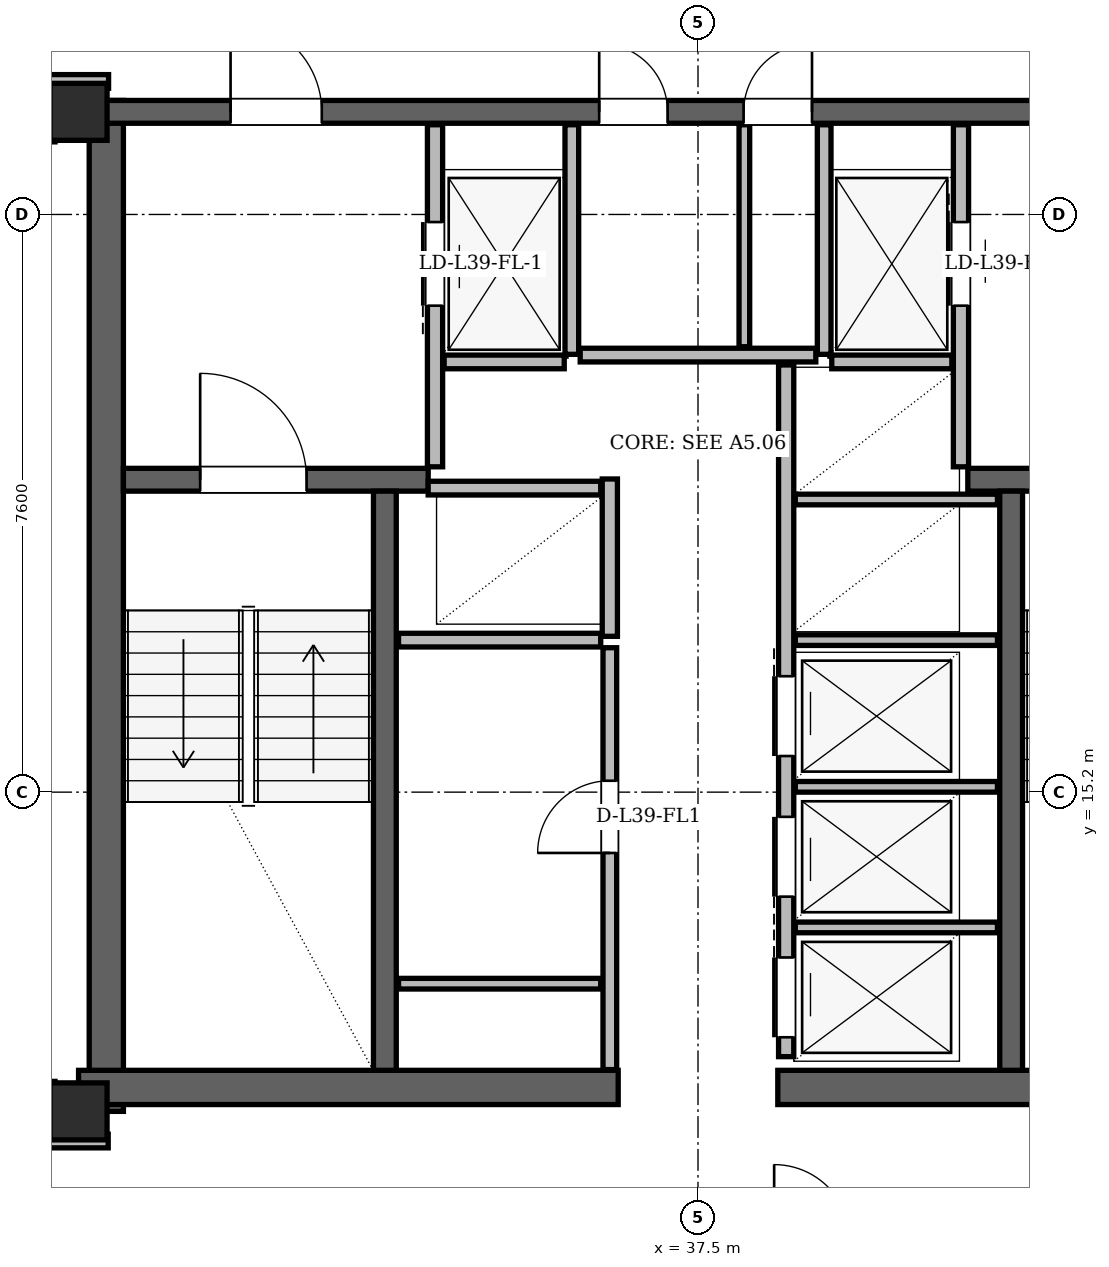
"""IFC4 building model, lengths in metres.
Left out: names, types, materials, properties, quantities, classifications, styles, units other than length and angle.
Written with IfcOpenShell. Run it as: python <this file> out.ifc"""

import sys

from ifc_helpers import new_model, si_unit, direction, frame, frame_2d, origin, origin_2d, place, context, subcontext, project, spatial, rectangle, hollow_rectangle, extrude, element, fill, save


model = new_model("IFC4")
c1 = context("Model", 3, precision=1e-05, world=origin(), true_north=direction((0.0, 1.0)))
c2 = subcontext(c1, "Body", "Model", "MODEL_VIEW")
j1 = project(units=[si_unit("LENGTHUNIT", "METRE"), si_unit("PLANEANGLEUNIT", "RADIAN")], contexts=[c1])
p1 = place(None, origin())
s1 = spatial("IfcSite", under=j1, at=p1, CompositionType="ELEMENT")
p2 = place(p1, origin())
s2 = spatial("IfcBuilding", under=s1, at=p2, CompositionType="ELEMENT")
p3 = place(p2, frame((0.0, 0.0, 149.4)))
s3 = spatial("IfcBuildingStorey", under=s2, at=p3, CompositionType="ELEMENT", Elevation=149.4)
for number, where, z_axis, x_axis in (
    (1, (29.35, 11.0, 0.0), (0.0, 0.0, 1.0), (1.0, 0.0, 0.0)),
    (2, (29.35, 24.15, 0.0), (0.0, 0.0, 1.0), (1.0, 0.0, 0.0)),
):
    element("IfcColumn", number, at=place(p3, frame(where, z_axis=z_axis, x_axis=x_axis)), inside=s3, PredefinedType="COLUMN", context=c2, shape_type="SweptSolid", body=[
        extrude(hollow_rectangle(XDim=0.75, YDim=0.75, WallThickness=0.06, at=origin_2d()), origin(), (0.0, 0.0, 1.0), 3.6),
    ])
p4 = place(p3, frame((29.715, 11.0, 0.0), z_axis=(0.0, 0.0, 1.0), x_axis=(0.0, 1.0, 0.0)))
e3 = element("IfcWall", 3, at=p4, inside=s3, PredefinedType="SHEAR", context=c2, shape_type="SweptSolid", body=[
    extrude(rectangle(XDim=13.3, YDim=0.45, at=frame_2d((6.65, 0.0))), origin(), (0.0, 0.0, 1.0), 3.38),
])
for number, where, z_axis, x_axis in (
    (4, (29.35, 11.315, 0.0), (0.0, 0.0, 1.0), (1.0, 0.0, 0.0)),
    (5, (38.55, 11.315, 0.0), (0.0, 0.0, 1.0), (1.0, 0.0, 0.0)),
):
    element("IfcWall", number, at=place(p3, frame(where, z_axis=z_axis, x_axis=x_axis)), inside=s3, PredefinedType="SHEAR", context=c2, shape_type="SweptSolid", body=[
        extrude(rectangle(XDim=7.1, YDim=0.45, at=frame_2d((3.55, 0.0))), origin(), (0.0, 0.0, 1.0), 3.38),
    ])
p5 = place(p3, frame((29.65, 24.15, 0.0), z_axis=(0.0, 0.0, 1.0), x_axis=(1.0, 0.0, 0.0)))
e6 = element("IfcWall", 6, at=p5, inside=s3, PredefinedType="SHEAR", context=c2, shape_type="SweptSolid", body=[
    extrude(rectangle(XDim=15.7, YDim=0.3, at=frame_2d((7.85, 0.0))), origin(), (0.0, 0.0, 1.0), 3.38),
])
p6 = place(p5, frame((1.7, 0.0, 0.0)))
e7 = element("IfcOpeningElement", 7, at=p6, cuts=e6, PredefinedType="OPENING", context=c2, shape_type="SweptSolid", body=[
    extrude(rectangle(XDim=1.2, YDim=2.2, at=frame_2d((0.6, 1.1))), frame((0.0, 0.15, 0.0), z_axis=(0.0, -1.0, 0.0), x_axis=(1.0, 0.0, 0.0)), (0.0, 0.0, 1.0), 0.3),
])
p7 = place(p5, frame((12.8, 0.0, 0.0)))
e8 = element("IfcOpeningElement", 8, at=p7, cuts=e6, PredefinedType="OPENING", context=c2, shape_type="SweptSolid", body=[
    extrude(rectangle(XDim=1.2, YDim=2.2, at=frame_2d((0.6, 1.1))), frame((0.0, 0.15, 0.0), z_axis=(0.0, -1.0, 0.0), x_axis=(1.0, 0.0, 0.0)), (0.0, 0.0, 1.0), 0.3),
])
p8 = place(p5, frame((6.55, 0.0, 0.0)))
e9 = element("IfcOpeningElement", 9, at=p8, cuts=e6, PredefinedType="OPENING", context=c2, shape_type="SweptSolid", body=[
    extrude(rectangle(XDim=0.9, YDim=2.05, at=frame_2d((0.45, 1.025))), frame((0.0, 0.15, 0.0), z_axis=(0.0, -1.0, 0.0), x_axis=(1.0, 0.0, 0.0)), (0.0, 0.0, 1.0), 0.3),
])
p9 = place(p5, frame((8.45, 0.0, 0.0)))
e10 = element("IfcOpeningElement", 10, at=p9, cuts=e6, PredefinedType="OPENING", context=c2, shape_type="SweptSolid", body=[
    extrude(rectangle(XDim=0.9, YDim=2.05, at=frame_2d((0.45, 1.025))), frame((0.0, 0.15, 0.0), z_axis=(0.0, -1.0, 0.0), x_axis=(1.0, 0.0, 0.0)), (0.0, 0.0, 1.0), 0.3),
])
p10 = place(p3, frame((29.94, 19.31, 0.0), z_axis=(0.0, 0.0, 1.0), x_axis=(1.0, 0.0, 0.0)))
e11 = element("IfcWall", 11, at=p10, inside=s3, PredefinedType="SHEAR", context=c2, shape_type="SweptSolid", body=[
    extrude(rectangle(XDim=4.01, YDim=0.3, at=frame_2d((2.005, 0.0))), origin(), (0.0, 0.0, 1.0), 3.38),
])
p11 = place(p10, frame((1.01, 0.0, 0.0)))
e12 = element("IfcOpeningElement", 12, at=p11, cuts=e11, PredefinedType="OPENING", context=c2, shape_type="SweptSolid", body=[
    extrude(rectangle(XDim=1.4, YDim=2.2, at=frame_2d((0.7, 1.1))), frame((0.0, 0.15, 0.0), z_axis=(0.0, -1.0, 0.0), x_axis=(1.0, 0.0, 0.0)), (0.0, 0.0, 1.0), 0.3),
])
p12 = place(p3, frame((41.05, 19.31, 0.0), z_axis=(0.0, 0.0, 1.0), x_axis=(1.0, 0.0, 0.0)))
e13 = element("IfcWall", 13, at=p12, inside=s3, PredefinedType="SHEAR", context=c2, shape_type="SweptSolid", body=[
    extrude(rectangle(XDim=4.01, YDim=0.3, at=frame_2d((2.005, 0.0))), origin(), (0.0, 0.0, 1.0), 3.38),
])
p13 = place(p12, frame((1.6, 0.0, 0.0)))
e14 = element("IfcOpeningElement", 14, at=p13, cuts=e13, PredefinedType="OPENING", context=c2, shape_type="SweptSolid", body=[
    extrude(rectangle(XDim=1.4, YDim=2.2, at=frame_2d((0.7, 1.1))), frame((0.0, 0.15, 0.0), z_axis=(0.0, -1.0, 0.0), x_axis=(1.0, 0.0, 0.0)), (0.0, 0.0, 1.0), 0.3),
])
for number, where, z_axis, x_axis in (
    (15, (33.38, 11.54, 0.0), (0.0, 0.0, 1.0), (0.0, 1.0, 0.0)),
    (16, (41.62, 11.54, 0.0), (0.0, 0.0, 1.0), (0.0, 1.0, 0.0)),
):
    element("IfcWall", number, at=place(p3, frame(where, z_axis=z_axis, x_axis=x_axis)), inside=s3, PredefinedType="SHEAR", context=c2, shape_type="SweptSolid", body=[
        extrude(rectangle(XDim=7.62, YDim=0.3, at=frame_2d((3.81, 0.0))), origin(), (0.0, 0.0, 1.0), 3.38),
    ])
p14 = place(p3, frame((32.734, 43.331, 0.0), z_axis=(0.0, 0.0, 1.0), x_axis=(-0.499998697515, -0.866026155773, 0.0)))
e17 = element("IfcWall", 17, at=p14, inside=s3, PredefinedType="SOLIDWALL", context=c2, shape_type="SweptSolid", body=[
    extrude(rectangle(XDim=35.472, YDim=0.34, at=frame_2d((17.736, 0.0))), origin(), (0.0, 0.0, 1.0), 2.6),
])
p15 = place(p14, frame((8.034, 0.0, 0.0)))
e18 = element("IfcOpeningElement", 18, at=p15, cuts=e17, PredefinedType="OPENING", context=c2, shape_type="SweptSolid", body=[
    extrude(rectangle(XDim=1.5, YDim=2.2, at=frame_2d((0.75, 1.1))), frame((0.0, 0.17, 0.0), z_axis=(0.0, -1.0, 0.0), x_axis=(1.0, 0.0, 0.0)), (0.0, 0.0, 1.0), 0.34),
])
p16 = place(p14, frame((26.973, 0.0, 0.0)))
e19 = element("IfcOpeningElement", 19, at=p16, cuts=e17, PredefinedType="OPENING", context=c2, shape_type="SweptSolid", body=[
    extrude(rectangle(XDim=1.5, YDim=2.2, at=frame_2d((0.75, 1.1))), frame((0.0, 0.17, 0.0), z_axis=(0.0, -1.0, 0.0), x_axis=(1.0, 0.0, 0.0)), (0.0, 0.0, 1.0), 0.34),
])
p17 = place(p14, frame((33.0, 0.0, 0.85)))
e20 = element("IfcOpeningElement", 20, at=p17, cuts=e17, PredefinedType="OPENING", context=c2, shape_type="SweptSolid", body=[
    extrude(rectangle(XDim=1.2, YDim=1.48, at=frame_2d((0.6, 0.74))), frame((0.0, 0.17, 0.0), z_axis=(0.0, -1.0, 0.0), x_axis=(1.0, 0.0, 0.0)), (0.0, 0.0, 1.0), 0.34),
])
p18 = place(p14, frame((17.767, 0.0, 0.85)))
e21 = element("IfcOpeningElement", 21, at=p18, cuts=e17, PredefinedType="OPENING", context=c2, shape_type="SweptSolid", body=[
    extrude(rectangle(XDim=1.2, YDim=1.48, at=frame_2d((0.6, 0.74))), frame((0.0, 0.17, 0.0), z_axis=(0.0, -1.0, 0.0), x_axis=(1.0, 0.0, 0.0)), (0.0, 0.0, 1.0), 0.34),
])
p19 = place(p14, frame((11.513, 0.0, 0.85)))
e22 = element("IfcOpeningElement", 22, at=p19, cuts=e17, PredefinedType="OPENING", context=c2, shape_type="SweptSolid", body=[
    extrude(rectangle(XDim=1.2, YDim=1.48, at=frame_2d((0.6, 0.74))), frame((0.0, 0.17, 0.0), z_axis=(0.0, -1.0, 0.0), x_axis=(1.0, 0.0, 0.0)), (0.0, 0.0, 1.0), 0.34),
])
p20 = place(p14, frame((14.179, 0.0, 0.85)))
e23 = element("IfcOpeningElement", 23, at=p20, cuts=e17, PredefinedType="OPENING", context=c2, shape_type="SweptSolid", body=[
    extrude(rectangle(XDim=1.2, YDim=1.48, at=frame_2d((0.6, 0.74))), frame((0.0, 0.17, 0.0), z_axis=(0.0, -1.0, 0.0), x_axis=(1.0, 0.0, 0.0)), (0.0, 0.0, 1.0), 0.34),
])
p21 = place(p14, frame((2.823, 0.0, 0.85)))
e24 = element("IfcOpeningElement", 24, at=p21, cuts=e17, PredefinedType="OPENING", context=c2, shape_type="SweptSolid", body=[
    extrude(rectangle(XDim=1.6, YDim=1.64, at=frame_2d((0.8, 0.82))), frame((0.0, 0.17, 0.0), z_axis=(0.0, -1.0, 0.0), x_axis=(1.0, 0.0, 0.0)), (0.0, 0.0, 1.0), 0.34),
])
p22 = place(p3, frame((34.04, 19.48, 0.0), z_axis=(0.0, 0.0, 1.0), x_axis=(0.0, 1.0, 0.0)))
e25 = element("IfcWall", 25, at=p22, inside=s3, PredefinedType="PARTITIONING", context=c2, shape_type="SweptSolid", body=[
    extrude(rectangle(XDim=4.5, YDim=0.2, at=frame_2d((2.25, 0.0))), origin(), (0.0, 0.0, 1.0), 2.42),
])
p23 = place(p22, frame((2.12, 0.0, 0.0)))
e26 = element("IfcOpeningElement", 26, at=p23, cuts=e25, PredefinedType="OPENING", context=c2, shape_type="SweptSolid", body=[
    extrude(rectangle(XDim=1.1, YDim=2.2, at=frame_2d((0.55, 1.1))), frame((0.0, 0.1, 0.0), z_axis=(0.0, -1.0, 0.0), x_axis=(1.0, 0.0, 0.0)), (0.0, 0.0, 1.0), 0.2),
])
p24 = place(p3, frame((35.84, 20.96, 0.0), z_axis=(0.0, 0.0, 1.0), x_axis=(0.0, 1.0, 0.0)))
e27 = element("IfcWall", 27, at=p24, inside=s3, PredefinedType="PARTITIONING", context=c2, shape_type="SweptSolid", body=[
    extrude(rectangle(XDim=3.02, YDim=0.18, at=frame_2d((1.51, 0.0))), origin(), (0.0, 0.0, 1.0), 2.42),
])
p25 = place(p3, frame((34.16, 20.86, 0.0), z_axis=(0.0, 0.0, 1.0), x_axis=(1.0, 0.0, 0.0)))
e28 = element("IfcWall", 28, at=p25, inside=s3, PredefinedType="PARTITIONING", context=c2, shape_type="SweptSolid", body=[
    extrude(rectangle(XDim=1.58, YDim=0.18, at=frame_2d((0.79, 0.0))), origin(), (0.0, 0.0, 1.0), 3.38),
])
p26 = place(p3, frame((40.96, 19.48, 0.0), z_axis=(0.0, 0.0, 1.0), x_axis=(0.0, 1.0, 0.0)))
e29 = element("IfcWall", 29, at=p26, inside=s3, PredefinedType="PARTITIONING", context=c2, shape_type="SweptSolid", body=[
    extrude(rectangle(XDim=4.5, YDim=0.2, at=frame_2d((2.25, 0.0))), origin(), (0.0, 0.0, 1.0), 2.42),
])
p27 = place(p26, frame((2.12, 0.0, 0.0)))
e30 = element("IfcOpeningElement", 30, at=p27, cuts=e29, PredefinedType="OPENING", context=c2, shape_type="SweptSolid", body=[
    extrude(rectangle(XDim=1.1, YDim=2.2, at=frame_2d((0.55, 1.1))), frame((0.0, 0.1, 0.0), z_axis=(0.0, -1.0, 0.0), x_axis=(1.0, 0.0, 0.0)), (0.0, 0.0, 1.0), 0.2),
])
p28 = place(p3, frame((39.16, 20.96, 0.0), z_axis=(0.0, 0.0, 1.0), x_axis=(0.0, 1.0, 0.0)))
e31 = element("IfcWall", 31, at=p28, inside=s3, PredefinedType="PARTITIONING", context=c2, shape_type="SweptSolid", body=[
    extrude(rectangle(XDim=3.02, YDim=0.18, at=frame_2d((1.51, 0.0))), origin(), (0.0, 0.0, 1.0), 2.42),
])
p29 = place(p3, frame((39.26, 20.86, 0.0), z_axis=(0.0, 0.0, 1.0), x_axis=(1.0, 0.0, 0.0)))
e32 = element("IfcWall", 32, at=p29, inside=s3, PredefinedType="PARTITIONING", context=c2, shape_type="SweptSolid", body=[
    extrude(rectangle(XDim=1.58, YDim=0.18, at=frame_2d((0.79, 0.0))), origin(), (0.0, 0.0, 1.0), 3.38),
])
p30 = place(p3, frame((36.34, 17.25, 0.0), z_axis=(0.0, 0.0, 1.0), x_axis=(0.0, 1.0, 0.0)))
e33 = element("IfcWall", 33, at=p30, inside=s3, PredefinedType="PARTITIONING", context=c2, shape_type="SweptSolid", body=[
    extrude(rectangle(XDim=2.07, YDim=0.2, at=frame_2d((1.035, 0.0))), origin(), (0.0, 0.0, 1.0), 3.38),
])
p31 = place(p3, frame((33.95, 19.2, 0.0), z_axis=(0.0, 0.0, 1.0), x_axis=(1.0, 0.0, 0.0)))
e34 = element("IfcWall", 34, at=p31, inside=s3, PredefinedType="PARTITIONING", context=c2, shape_type="SweptSolid", body=[
    extrude(rectangle(XDim=2.27, YDim=0.18, at=frame_2d((1.135, 0.0))), origin(), (0.0, 0.0, 1.0), 3.38),
])
p32 = place(p3, frame((33.56, 17.2, 0.0), z_axis=(0.0, 0.0, 1.0), x_axis=(1.0, 0.0, 0.0)))
e35 = element("IfcWall", 35, at=p32, inside=s3, PredefinedType="PARTITIONING", context=c2, shape_type="SweptSolid", body=[
    extrude(rectangle(XDim=2.66, YDim=0.18, at=frame_2d((1.33, 0.0))), origin(), (0.0, 0.0, 1.0), 3.38),
])
p33 = place(p3, frame((36.34, 11.55, 0.0), z_axis=(0.0, 0.0, 1.0), x_axis=(0.0, 1.0, 0.0)))
e36 = element("IfcWall", 36, at=p33, inside=s3, PredefinedType="PARTITIONING", context=c2, shape_type="SweptSolid", body=[
    extrude(rectangle(XDim=5.55, YDim=0.18, at=frame_2d((2.775, 0.0))), origin(), (0.0, 0.0, 1.0), 3.38),
])
p34 = place(p33, frame((2.85, 0.0, 0.0)))
e37 = element("IfcOpeningElement", 37, at=p34, cuts=e36, PredefinedType="OPENING", context=c2, shape_type="SweptSolid", body=[
    extrude(rectangle(XDim=0.95, YDim=2.1, at=frame_2d((0.475, 1.05))), frame((0.0, 0.09, 0.0), z_axis=(0.0, -1.0, 0.0), x_axis=(1.0, 0.0, 0.0)), (0.0, 0.0, 1.0), 0.18),
])
p35 = place(p3, frame((33.56, 12.68, 0.0), z_axis=(0.0, 0.0, 1.0), x_axis=(1.0, 0.0, 0.0)))
e38 = element("IfcWall", 38, at=p35, inside=s3, PredefinedType="PARTITIONING", context=c2, shape_type="SweptSolid", body=[
    extrude(rectangle(XDim=2.66, YDim=0.14, at=frame_2d((1.33, 0.0))), origin(), (0.0, 0.0, 1.0), 3.38),
])
p36 = place(p3, frame((38.66, 11.72, 0.0), z_axis=(0.0, 0.0, 1.0), x_axis=(0.0, 1.0, 0.0)))
e39 = element("IfcWall", 39, at=p36, inside=s3, PredefinedType="PARTITIONING", context=c2, shape_type="SweptSolid", body=[
    extrude(rectangle(XDim=9.1, YDim=0.2, at=frame_2d((4.55, 0.0))), origin(), (0.0, 0.0, 1.0), 3.38),
])
p37 = place(p36, frame((0.255, 0.0, 0.0)))
e40 = element("IfcOpeningElement", 40, at=p37, cuts=e39, PredefinedType="OPENING", context=c2, shape_type="SweptSolid", body=[
    extrude(rectangle(XDim=1.05, YDim=2.15, at=frame_2d((0.525, 1.075))), frame((0.0, 0.1, 0.0), z_axis=(0.0, -1.0, 0.0), x_axis=(1.0, 0.0, 0.0)), (0.0, 0.0, 1.0), 0.2),
])
p38 = place(p36, frame((2.105, 0.0, 0.0)))
e41 = element("IfcOpeningElement", 41, at=p38, cuts=e39, PredefinedType="OPENING", context=c2, shape_type="SweptSolid", body=[
    extrude(rectangle(XDim=1.05, YDim=2.15, at=frame_2d((0.525, 1.075))), frame((0.0, 0.1, 0.0), z_axis=(0.0, -1.0, 0.0), x_axis=(1.0, 0.0, 0.0)), (0.0, 0.0, 1.0), 0.2),
])
p39 = place(p36, frame((3.955, 0.0, 0.0)))
e42 = element("IfcOpeningElement", 42, at=p39, cuts=e39, PredefinedType="OPENING", context=c2, shape_type="SweptSolid", body=[
    extrude(rectangle(XDim=1.05, YDim=2.15, at=frame_2d((0.525, 1.075))), frame((0.0, 0.1, 0.0), z_axis=(0.0, -1.0, 0.0), x_axis=(1.0, 0.0, 0.0)), (0.0, 0.0, 1.0), 0.2),
])
for number, where, z_axis, x_axis in (
    (43, (38.78, 13.42, 0.0), (0.0, 0.0, 1.0), (1.0, 0.0, 0.0)),
    (44, (38.78, 15.27, 0.0), (0.0, 0.0, 1.0), (1.0, 0.0, 0.0)),
    (45, (38.78, 17.2, 0.0), (0.0, 0.0, 1.0), (1.0, 0.0, 0.0)),
    (46, (38.78, 19.05, 0.0), (0.0, 0.0, 1.0), (1.0, 0.0, 0.0)),
):
    element("IfcWall", number, at=place(p3, frame(where, z_axis=z_axis, x_axis=x_axis)), inside=s3, PredefinedType="PARTITIONING", context=c2, shape_type="SweptSolid", body=[
        extrude(rectangle(XDim=2.66, YDim=0.14, at=frame_2d((1.33, 0.0))), origin(), (0.0, 0.0, 1.0), 3.38),
    ])
p40 = place(p3, frame((35.95, 20.95, 0.0), z_axis=(0.0, 0.0, 1.0), x_axis=(1.0, 0.0, 0.0)))
e47 = element("IfcWall", 47, at=p40, inside=s3, PredefinedType="PARTITIONING", context=c2, shape_type="SweptSolid", body=[
    extrude(rectangle(XDim=3.1, YDim=0.18, at=frame_2d((1.55, 0.0))), origin(), (0.0, 0.0, 1.0), 3.38),
])
p41 = place(p3, frame((38.11, 21.06, 0.0), z_axis=(0.0, 0.0, 1.0), x_axis=(0.0, 1.0, 0.0)))
e48 = element("IfcWall", 48, at=p41, inside=s3, PredefinedType="PARTITIONING", context=c2, shape_type="SweptSolid", body=[
    extrude(rectangle(XDim=2.92, YDim=0.14, at=frame_2d((1.46, 0.0))), origin(), (0.0, 0.0, 1.0), 2.42),
])
p42 = place(p3, frame((28.96, 10.61, 0.0), z_axis=(0.0, 0.0, 1.0), x_axis=(1.0, 0.0, 0.0)))
e49 = element("IfcWall", 49, at=p42, inside=s3, PredefinedType="PARTITIONING", context=c2, shape_type="SweptSolid", body=[
    extrude(rectangle(XDim=0.78, YDim=0.18, at=frame_2d((0.39, 0.0))), origin(), (0.0, 0.0, 1.0), 3.38),
])
p43 = place(p3, frame((28.955, 24.55, 0.0), z_axis=(0.0, 0.0, 1.0), x_axis=(1.0, 0.0, 0.0)))
e50 = element("IfcWall", 50, at=p43, inside=s3, PredefinedType="PARTITIONING", context=c2, shape_type="SweptSolid", body=[
    extrude(rectangle(XDim=0.79, YDim=0.18, at=frame_2d((0.395, 0.0))), origin(), (0.0, 0.0, 1.0), 2.842),
])
p44 = place(p3, frame((28.95, 10.95, 0.0), z_axis=(0.0, 0.0, 1.0), x_axis=(0.0, 1.0, 0.0)))
e51 = element("IfcWall", 51, at=p44, inside=s3, PredefinedType="PARTITIONING", context=c2, shape_type="SweptSolid", body=[
    extrude(rectangle(XDim=0.445, YDim=0.18, at=frame_2d((0.223, 0.0))), origin(), (0.0, 0.0, 1.0), 2.842),
])
p45 = place(p3, frame((28.95, 23.755, 0.0), z_axis=(0.0, 0.0, 1.0), x_axis=(0.0, 1.0, 0.0)))
e52 = element("IfcWall", 52, at=p45, inside=s3, PredefinedType="PARTITIONING", context=c2, shape_type="SweptSolid", body=[
    extrude(rectangle(XDim=0.565, YDim=0.18, at=frame_2d((0.283, 0.0))), origin(), (0.0, 0.0, 1.0), 3.38),
])
p46 = place(p34, origin())
e53 = element("IfcDoor", 53, at=p46, inside=s3, OperationType="SINGLE_SWING_LEFT", PredefinedType="DOOR", context=c2, shape_type="SweptSolid", body=[
    extrude(rectangle(XDim=0.95, YDim=2.1, at=frame_2d((0.475, 1.05))), frame((0.0, 0.025, 0.0), z_axis=(0.0, -1.0, 0.0), x_axis=(1.0, 0.0, 0.0)), (0.0, 0.0, 1.0), 0.05),
])
fill(e37, e53)
p47 = place(p23, origin())
e54 = element("IfcDoor", 54, at=p47, inside=s3, OperationType="SLIDING_TO_LEFT", PredefinedType="DOOR", context=c2, shape_type="SweptSolid", body=[
    extrude(rectangle(XDim=1.1, YDim=2.2, at=frame_2d((0.55, 1.1))), frame((0.0, 0.025, 0.0), z_axis=(0.0, -1.0, 0.0), x_axis=(1.0, 0.0, 0.0)), (0.0, 0.0, 1.0), 0.05),
])
fill(e26, e54)
p48 = place(p27, origin())
e55 = element("IfcDoor", 55, at=p48, inside=s3, OperationType="SLIDING_TO_RIGHT", PredefinedType="DOOR", context=c2, shape_type="SweptSolid", body=[
    extrude(rectangle(XDim=1.1, YDim=2.2, at=frame_2d((0.55, 1.1))), frame((0.0, 0.025, 0.0), z_axis=(0.0, -1.0, 0.0), x_axis=(1.0, 0.0, 0.0)), (0.0, 0.0, 1.0), 0.05),
])
fill(e30, e55)
p49 = place(p37, origin())
e56 = element("IfcDoor", 56, at=p49, inside=s3, OperationType="SLIDING_TO_RIGHT", PredefinedType="DOOR", context=c2, shape_type="SweptSolid", body=[
    extrude(rectangle(XDim=1.05, YDim=2.15, at=frame_2d((0.525, 1.075))), frame((0.0, 0.025, 0.0), z_axis=(0.0, -1.0, 0.0), x_axis=(1.0, 0.0, 0.0)), (0.0, 0.0, 1.0), 0.05),
])
fill(e40, e56)
p50 = place(p38, origin())
e57 = element("IfcDoor", 57, at=p50, inside=s3, OperationType="SLIDING_TO_LEFT", PredefinedType="DOOR", context=c2, shape_type="SweptSolid", body=[
    extrude(rectangle(XDim=1.05, YDim=2.15, at=frame_2d((0.525, 1.075))), frame((0.0, 0.025, 0.0), z_axis=(0.0, -1.0, 0.0), x_axis=(1.0, 0.0, 0.0)), (0.0, 0.0, 1.0), 0.05),
])
fill(e41, e57)
p51 = place(p39, origin())
e58 = element("IfcDoor", 58, at=p51, inside=s3, OperationType="SLIDING_TO_RIGHT", PredefinedType="DOOR", context=c2, shape_type="SweptSolid", body=[
    extrude(rectangle(XDim=1.05, YDim=2.15, at=frame_2d((0.525, 1.075))), frame((0.0, 0.025, 0.0), z_axis=(0.0, -1.0, 0.0), x_axis=(1.0, 0.0, 0.0)), (0.0, 0.0, 1.0), 0.05),
])
fill(e42, e58)
p52 = place(p11, origin())
e59 = element("IfcDoor", 59, at=p52, inside=s3, OperationType="SINGLE_SWING_LEFT", PredefinedType="DOOR", context=c2, shape_type="SweptSolid", body=[
    extrude(rectangle(XDim=1.4, YDim=2.2, at=frame_2d((0.7, 1.1))), frame((0.0, 0.025, 0.0), z_axis=(0.0, -1.0, 0.0), x_axis=(1.0, 0.0, 0.0)), (0.0, 0.0, 1.0), 0.05),
])
fill(e12, e59)
p53 = place(p6, origin())
e60 = element("IfcDoor", 60, at=p53, inside=s3, OperationType="SINGLE_SWING_LEFT", PredefinedType="DOOR", context=c2, shape_type="SweptSolid", body=[
    extrude(rectangle(XDim=1.2, YDim=2.2, at=frame_2d((0.6, 1.1))), frame((0.0, 0.025, 0.0), z_axis=(0.0, -1.0, 0.0), x_axis=(1.0, 0.0, 0.0)), (0.0, 0.0, 1.0), 0.05),
])
fill(e7, e60)
p54 = place(p8, origin())
e61 = element("IfcDoor", 61, at=p54, inside=s3, OperationType="SINGLE_SWING_LEFT", PredefinedType="DOOR", context=c2, shape_type="SweptSolid", body=[
    extrude(rectangle(XDim=0.9, YDim=2.05, at=frame_2d((0.45, 1.025))), frame((0.0, 0.025, 0.0), z_axis=(0.0, -1.0, 0.0), x_axis=(1.0, 0.0, 0.0)), (0.0, 0.0, 1.0), 0.05),
])
fill(e9, e61)
p55 = place(p9, origin())
e62 = element("IfcDoor", 62, at=p55, inside=s3, OperationType="SINGLE_SWING_RIGHT", PredefinedType="DOOR", context=c2, shape_type="SweptSolid", body=[
    extrude(rectangle(XDim=0.9, YDim=2.05, at=frame_2d((0.45, 1.025))), frame((0.0, 0.025, 0.0), z_axis=(0.0, -1.0, 0.0), x_axis=(1.0, 0.0, 0.0)), (0.0, 0.0, 1.0), 0.05),
])
fill(e10, e62)
save(model, sys.argv[1])
